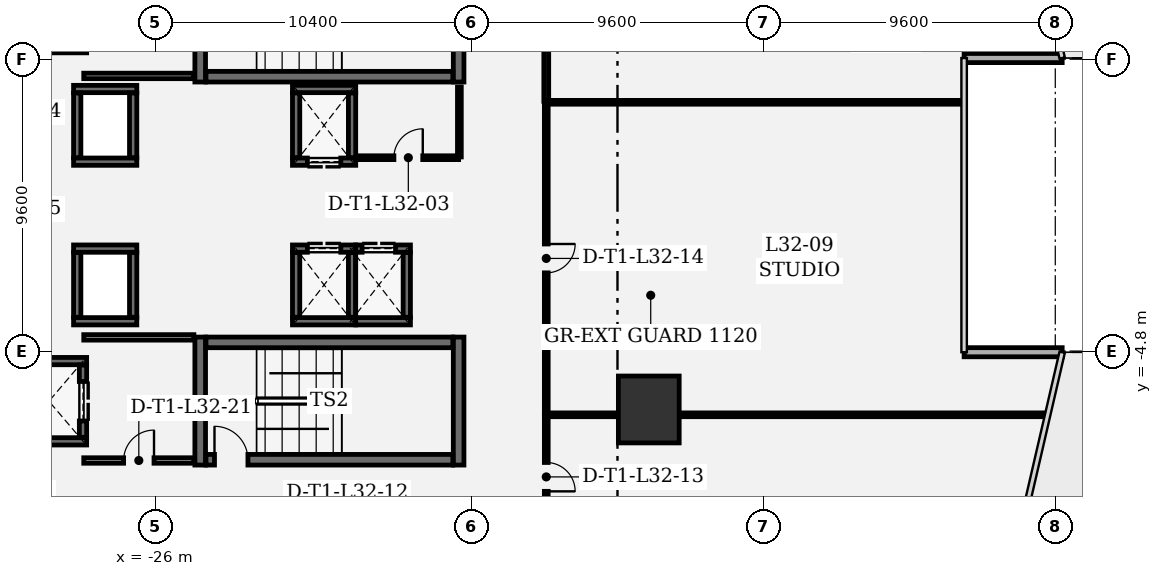
"""IFC4 building model, lengths in metres.
Left out: names, types, materials, properties, quantities, classifications, styles, units other than length and angle.
Written with IfcOpenShell. Run it as: python <this file> out.ifc"""

import sys

from ifc_helpers import new_model, si_unit, direction, frame, frame_2d, origin, origin_2d, place, context, subcontext, project, spatial, rectangle, extrude, element, fill, save


model = new_model("IFC4")
c1 = context("Model", 3, precision=1e-05, world=origin(), true_north=direction((0.0, 1.0)))
c2 = subcontext(c1, "Body", "Model", "MODEL_VIEW")
j1 = project(units=[si_unit("LENGTHUNIT", "METRE"), si_unit("PLANEANGLEUNIT", "RADIAN")], contexts=[c1])
p1 = place(None, origin())
s1 = spatial("IfcSite", under=j1, at=p1, CompositionType="ELEMENT")
p2 = place(p1, origin())
s2 = spatial("IfcBuilding", under=s1, at=p2, CompositionType="ELEMENT")
p3 = place(p2, frame((0.0, 0.0, 142.2)))
s3 = spatial("IfcBuildingStorey", under=s2, at=p3, CompositionType="ELEMENT", Elevation=142.2)
p4 = place(p3, frame((-9.77, -6.721, 0.0), z_axis=(0.0, 0.0, 1.0), x_axis=(1.0, 0.0, 0.0)))
e1 = element("IfcColumn", 1, at=p4, inside=s3, PredefinedType="COLUMN", context=c2, shape_type="SweptSolid", body=[
    extrude(rectangle(XDim=2.0, YDim=2.2, at=origin_2d()), origin(), (0.0, 0.0, 1.0), 4.05),
])
for number, where, z_axis, x_axis in (
    (2, (3.827, -4.838, 0.0), (0.0, 0.0, 1.0), (-1.0, 0.0, 0.0)),
    (3, (0.602, 4.838, 0.0), (0.0, 0.0, 1.0), (1.0, 0.0, 0.0)),
):
    element("IfcWall", number, at=place(p3, frame(where, z_axis=z_axis, x_axis=x_axis)), inside=s3, PredefinedType="SOLIDWALL", context=c2, shape_type="SweptSolid", body=[
        extrude(rectangle(XDim=3.226, YDim=0.3, at=frame_2d((1.613, 0.0))), origin(), (0.0, 0.0, 1.0), 3.78),
    ])
for number, where, z_axis, x_axis in (
    (4, (-24.525, 8.26, 0.0), (0.0, 0.0, 1.0), (0.0, -1.0, 0.0)),
    (5, (-16.025, 4.05, 0.0), (0.0, 0.0, 1.0), (0.0, 1.0, 0.0)),
):
    element("IfcWall", number, at=place(p3, frame(where, z_axis=z_axis, x_axis=x_axis)), inside=s3, PredefinedType="SHEAR", context=c2, shape_type="SweptSolid", body=[
        extrude(rectangle(XDim=4.21, YDim=0.35, at=frame_2d((2.105, 0.0))), origin(), (0.0, 0.0, 1.0), 3.78),
    ])
p5 = place(p3, frame((-24.335, 4.225, 0.0), z_axis=(0.0, 0.0, 1.0), x_axis=(1.0, 0.0, 0.0)))
e6 = element("IfcWall", 6, at=p5, inside=s3, PredefinedType="SHEAR", context=c2, shape_type="SweptSolid", body=[
    extrude(rectangle(XDim=8.12, YDim=0.35, at=frame_2d((4.06, 0.0))), origin(), (0.0, 0.0, 1.0), 3.78),
])
for number, where, z_axis, x_axis in (
    (7, (-24.525, -4.34, 0.0), (0.0, 0.0, 1.0), (0.0, -1.0, 0.0)),
    (8, (-16.025, -8.55, 0.0), (0.0, 0.0, 1.0), (0.0, 1.0, 0.0)),
):
    element("IfcWall", number, at=place(p3, frame(where, z_axis=z_axis, x_axis=x_axis)), inside=s3, PredefinedType="SHEAR", context=c2, shape_type="SweptSolid", body=[
        extrude(rectangle(XDim=4.21, YDim=0.35, at=frame_2d((2.105, 0.0))), origin(), (0.0, 0.0, 1.0), 3.78),
    ])
p6 = place(p3, frame((-24.335, -8.375, 0.0), z_axis=(0.0, 0.0, 1.0), x_axis=(1.0, 0.0, 0.0)))
e9 = element("IfcWall", 9, at=p6, inside=s3, PredefinedType="SHEAR", context=c2, shape_type="SweptSolid", body=[
    extrude(rectangle(XDim=8.12, YDim=0.35, at=frame_2d((4.06, 0.0))), origin(), (0.0, 0.0, 1.0), 3.78),
])
p7 = place(p6, frame((0.28, 0.0, 0.0)))
e10 = element("IfcOpeningElement", 10, at=p7, cuts=e9, PredefinedType="OPENING", context=c2, shape_type="SweptSolid", body=[
    extrude(rectangle(XDim=1.1, YDim=2.2, at=frame_2d((0.55, 1.1))), frame((0.0, 0.185, 0.0), z_axis=(0.0, -1.0, 0.0), x_axis=(1.0, 0.0, 0.0)), (0.0, 0.0, 1.0), 0.37),
])
p8 = place(p3, frame((-16.215, -4.515, 0.0), z_axis=(0.0, 0.0, 1.0), x_axis=(-1.0, 0.0, 0.0)))
e11 = element("IfcWall", 11, at=p8, inside=s3, PredefinedType="SHEAR", context=c2, shape_type="SweptSolid", body=[
    extrude(rectangle(XDim=8.12, YDim=0.35, at=frame_2d((4.06, 0.0))), origin(), (0.0, 0.0, 1.0), 3.78),
])
for number, where, z_axis, x_axis in (
    (12, (-28.26, 5.13, 0.0), (0.0, 0.0, 1.0), (-1.0, 0.0, 0.0)),
    (13, (-28.26, -7.77, 0.0), (0.0, 0.0, 1.0), (-1.0, 0.0, 0.0)),
    (14, (-30.74, -5.13, 0.0), (0.0, 0.0, 1.0), (1.0, 0.0, 0.0)),
):
    element("IfcWall", number, at=place(p3, frame(where, z_axis=z_axis, x_axis=x_axis)), inside=s3, PredefinedType="SHEAR", context=c2, shape_type="SweptSolid", body=[
        extrude(rectangle(XDim=2.48, YDim=0.24, at=frame_2d((1.24, 0.0))), origin(), (0.0, 0.0, 1.0), 3.78),
    ])
p9 = place(p3, frame((-28.38, -5.262, 0.0), z_axis=(0.0, 0.0, 1.0), x_axis=(0.0, -1.0, 0.0)))
e15 = element("IfcWall", 15, at=p9, inside=s3, PredefinedType="SHEAR", context=c2, shape_type="SweptSolid", body=[
    extrude(rectangle(XDim=2.376, YDim=0.24, at=frame_2d((1.188, 0.0))), origin(), (0.0, 0.0, 1.0), 3.78),
])
p10 = place(p9, frame((0.538, 0.0, 0.0)))
e16 = element("IfcOpeningElement", 16, at=p10, cuts=e15, PredefinedType="OPENING", context=c2, shape_type="SweptSolid", body=[
    extrude(rectangle(XDim=1.3, YDim=2.3, at=frame_2d((0.65, 1.15))), frame((0.0, 0.13, 0.0), z_axis=(0.0, -1.0, 0.0), x_axis=(1.0, 0.0, 0.0)), (0.0, 0.0, 1.0), 0.26),
])
for number, where, z_axis, x_axis in (
    (17, (-26.61, 1.43, 0.0), (0.0, 0.0, 1.0), (-1.0, 0.0, 0.0)),
    (18, (-28.69, 3.82, 0.0), (0.0, 0.0, 1.0), (1.0, 0.0, 0.0)),
):
    element("IfcWall", number, at=place(p3, frame(where, z_axis=z_axis, x_axis=x_axis)), inside=s3, PredefinedType="SHEAR", context=c2, shape_type="SweptSolid", body=[
        extrude(rectangle(XDim=2.08, YDim=0.24, at=frame_2d((1.04, 0.0))), origin(), (0.0, 0.0, 1.0), 3.78),
    ])
for number, where, z_axis, x_axis in (
    (19, (-28.57, 1.562, 0.0), (0.0, 0.0, 1.0), (0.0, 1.0, 0.0)),
    (20, (-26.73, 3.688, 0.0), (0.0, 0.0, 1.0), (0.0, -1.0, 0.0)),
):
    element("IfcWall", number, at=place(p3, frame(where, z_axis=z_axis, x_axis=x_axis)), inside=s3, PredefinedType="SHEAR", context=c2, shape_type="SweptSolid", body=[
        extrude(rectangle(XDim=2.126, YDim=0.24, at=frame_2d((1.063, 0.0))), origin(), (0.0, 0.0, 1.0), 3.78),
    ])
p11 = place(p3, frame((-19.41, 1.43, 0.0), z_axis=(0.0, 0.0, 1.0), x_axis=(-1.0, 0.0, 0.0)))
e21 = element("IfcWall", 21, at=p11, inside=s3, PredefinedType="SHEAR", context=c2, shape_type="SweptSolid", body=[
    extrude(rectangle(XDim=2.08, YDim=0.24, at=frame_2d((1.04, 0.0))), origin(), (0.0, 0.0, 1.0), 3.78),
])
p12 = place(p11, frame((0.49, 0.0, 0.0)))
e22 = element("IfcOpeningElement", 22, at=p12, cuts=e21, PredefinedType="OPENING", context=c2, shape_type="SweptSolid", body=[
    extrude(rectangle(XDim=1.1, YDim=2.2, at=frame_2d((0.55, 1.1))), frame((0.0, 0.13, 0.0), z_axis=(0.0, -1.0, 0.0), x_axis=(1.0, 0.0, 0.0)), (0.0, 0.0, 1.0), 0.26),
])
p13 = place(p3, frame((-21.49, 3.82, 0.0), z_axis=(0.0, 0.0, 1.0), x_axis=(1.0, 0.0, 0.0)))
e23 = element("IfcWall", 23, at=p13, inside=s3, PredefinedType="SHEAR", context=c2, shape_type="SweptSolid", body=[
    extrude(rectangle(XDim=2.08, YDim=0.24, at=frame_2d((1.04, 0.0))), origin(), (0.0, 0.0, 1.0), 3.78),
])
for number, where, z_axis, x_axis in (
    (24, (-21.37, 1.562, 0.0), (0.0, 0.0, 1.0), (0.0, 1.0, 0.0)),
    (25, (-19.53, 3.688, 0.0), (0.0, 0.0, 1.0), (0.0, -1.0, 0.0)),
):
    element("IfcWall", number, at=place(p3, frame(where, z_axis=z_axis, x_axis=x_axis)), inside=s3, PredefinedType="SHEAR", context=c2, shape_type="SweptSolid", body=[
        extrude(rectangle(XDim=2.126, YDim=0.24, at=frame_2d((1.063, 0.0))), origin(), (0.0, 0.0, 1.0), 3.78),
    ])
for number, where, z_axis, x_axis in (
    (26, (-26.61, -3.82, 0.0), (0.0, 0.0, 1.0), (-1.0, 0.0, 0.0)),
    (27, (-28.69, -1.43, 0.0), (0.0, 0.0, 1.0), (1.0, 0.0, 0.0)),
):
    element("IfcWall", number, at=place(p3, frame(where, z_axis=z_axis, x_axis=x_axis)), inside=s3, PredefinedType="SHEAR", context=c2, shape_type="SweptSolid", body=[
        extrude(rectangle(XDim=2.08, YDim=0.24, at=frame_2d((1.04, 0.0))), origin(), (0.0, 0.0, 1.0), 3.78),
    ])
for number, where, z_axis, x_axis in (
    (28, (-28.57, -3.688, 0.0), (0.0, 0.0, 1.0), (0.0, 1.0, 0.0)),
    (29, (-26.73, -1.562, 0.0), (0.0, 0.0, 1.0), (0.0, -1.0, 0.0)),
):
    element("IfcWall", number, at=place(p3, frame(where, z_axis=z_axis, x_axis=x_axis)), inside=s3, PredefinedType="SHEAR", context=c2, shape_type="SweptSolid", body=[
        extrude(rectangle(XDim=2.126, YDim=0.24, at=frame_2d((1.063, 0.0))), origin(), (0.0, 0.0, 1.0), 3.78),
    ])
p14 = place(p3, frame((-19.41, -3.82, 0.0), z_axis=(0.0, 0.0, 1.0), x_axis=(-1.0, 0.0, 0.0)))
e30 = element("IfcWall", 30, at=p14, inside=s3, PredefinedType="SHEAR", context=c2, shape_type="SweptSolid", body=[
    extrude(rectangle(XDim=2.08, YDim=0.24, at=frame_2d((1.04, 0.0))), origin(), (0.0, 0.0, 1.0), 3.78),
])
p15 = place(p3, frame((-21.49, -1.43, 0.0), z_axis=(0.0, 0.0, 1.0), x_axis=(1.0, 0.0, 0.0)))
e31 = element("IfcWall", 31, at=p15, inside=s3, PredefinedType="SHEAR", context=c2, shape_type="SweptSolid", body=[
    extrude(rectangle(XDim=2.08, YDim=0.24, at=frame_2d((1.04, 0.0))), origin(), (0.0, 0.0, 1.0), 3.78),
])
p16 = place(p15, frame((0.49, 0.0, 0.0)))
e32 = element("IfcOpeningElement", 32, at=p16, cuts=e31, PredefinedType="OPENING", context=c2, shape_type="SweptSolid", body=[
    extrude(rectangle(XDim=1.1, YDim=2.2, at=frame_2d((0.55, 1.1))), frame((0.0, 0.13, 0.0), z_axis=(0.0, -1.0, 0.0), x_axis=(1.0, 0.0, 0.0)), (0.0, 0.0, 1.0), 0.26),
])
for number, where, z_axis, x_axis in (
    (33, (-21.37, -3.688, 0.0), (0.0, 0.0, 1.0), (0.0, 1.0, 0.0)),
    (34, (-19.53, -1.562, 0.0), (0.0, 0.0, 1.0), (0.0, -1.0, 0.0)),
):
    element("IfcWall", number, at=place(p3, frame(where, z_axis=z_axis, x_axis=x_axis)), inside=s3, PredefinedType="SHEAR", context=c2, shape_type="SweptSolid", body=[
        extrude(rectangle(XDim=2.126, YDim=0.24, at=frame_2d((1.063, 0.0))), origin(), (0.0, 0.0, 1.0), 3.78),
    ])
p17 = place(p3, frame((-17.61, -3.82, 0.0), z_axis=(0.0, 0.0, 1.0), x_axis=(-1.0, 0.0, 0.0)))
e35 = element("IfcWall", 35, at=p17, inside=s3, PredefinedType="SHEAR", context=c2, shape_type="SweptSolid", body=[
    extrude(rectangle(XDim=1.8, YDim=0.24, at=frame_2d((0.9, 0.0))), origin(), (0.0, 0.0, 1.0), 3.78),
])
p18 = place(p3, frame((-19.41, -1.43, 0.0), z_axis=(0.0, 0.0, 1.0), x_axis=(1.0, 0.0, 0.0)))
e36 = element("IfcWall", 36, at=p18, inside=s3, PredefinedType="SHEAR", context=c2, shape_type="SweptSolid", body=[
    extrude(rectangle(XDim=1.8, YDim=0.24, at=frame_2d((0.9, 0.0))), origin(), (0.0, 0.0, 1.0), 3.78),
])
p19 = place(p18, frame((0.21, 0.0, 0.0)))
e37 = element("IfcOpeningElement", 37, at=p19, cuts=e36, PredefinedType="OPENING", context=c2, shape_type="SweptSolid", body=[
    extrude(rectangle(XDim=1.1, YDim=2.2, at=frame_2d((0.55, 1.1))), frame((0.0, 0.13, 0.0), z_axis=(0.0, -1.0, 0.0), x_axis=(1.0, 0.0, 0.0)), (0.0, 0.0, 1.0), 0.26),
])
p20 = place(p3, frame((-17.73, -1.562, 0.0), z_axis=(0.0, 0.0, 1.0), x_axis=(0.0, -1.0, 0.0)))
e38 = element("IfcWall", 38, at=p20, inside=s3, PredefinedType="SHEAR", context=c2, shape_type="SweptSolid", body=[
    extrude(rectangle(XDim=2.126, YDim=0.24, at=frame_2d((1.063, 0.0))), origin(), (0.0, 0.0, 1.0), 3.78),
])
p21 = place(p3, frame((-28.355, 4.25, 0.0), z_axis=(0.0, 0.0, 1.0), x_axis=(1.0, 0.0, 0.0)))
e39 = element("IfcWall", 39, at=p21, inside=s3, PredefinedType="PARTITIONING", context=c2, shape_type="SweptSolid", body=[
    extrude(rectangle(XDim=3.622, YDim=0.18, at=frame_2d((1.811, 0.0))), origin(), (0.0, 0.0, 1.0), 3.78),
])
p22 = place(p3, frame((-28.355, -8.4, 0.0), z_axis=(0.0, 0.0, 1.0), x_axis=(1.0, 0.0, 0.0)))
e40 = element("IfcWall", 40, at=p22, inside=s3, PredefinedType="PARTITIONING", context=c2, shape_type="SweptSolid", body=[
    extrude(rectangle(XDim=3.622, YDim=0.18, at=frame_2d((1.811, 0.0))), origin(), (0.0, 0.0, 1.0), 3.78),
])
p23 = place(p22, frame((1.311, 0.0, 0.0)))
e41 = element("IfcOpeningElement", 41, at=p23, cuts=e40, PredefinedType="OPENING", context=c2, shape_type="SweptSolid", body=[
    extrude(rectangle(XDim=1.0, YDim=2.15, at=frame_2d((0.5, 1.075))), frame((0.0, 0.1, 0.0), z_axis=(0.0, -1.0, 0.0), x_axis=(1.0, 0.0, 0.0)), (0.0, 0.0, 1.0), 0.2),
])
p24 = place(p3, frame((-24.733, -4.35, 0.0), z_axis=(0.0, 0.0, 1.0), x_axis=(-1.0, 0.0, 0.0)))
e42 = element("IfcWall", 42, at=p24, inside=s3, PredefinedType="PARTITIONING", context=c2, shape_type="SweptSolid", body=[
    extrude(rectangle(XDim=3.622, YDim=0.18, at=frame_2d((1.811, 0.0))), origin(), (0.0, 0.0, 1.0), 3.78),
])
p25 = place(p3, frame((-19.334, 1.56, 0.0), z_axis=(0.0, 0.0, 1.0), x_axis=(1.0, 0.0, 0.0)))
e43 = element("IfcWall", 43, at=p25, inside=s3, PredefinedType="PARTITIONING", context=c2, shape_type="SweptSolid", body=[
    extrude(rectangle(XDim=3.309, YDim=0.125, at=frame_2d((1.654, 0.0))), origin(), (0.0, 0.0, 1.0), 3.78),
])
p26 = place(p25, frame((1.179, 0.0, 0.0)))
e44 = element("IfcOpeningElement", 44, at=p26, cuts=e43, PredefinedType="OPENING", context=c2, shape_type="SweptSolid", body=[
    extrude(rectangle(XDim=0.95, YDim=2.15, at=frame_2d((0.475, 1.075))), frame((0.0, 0.073, 0.0), z_axis=(0.0, -1.0, 0.0), x_axis=(1.0, 0.0, 0.0)), (0.0, 0.0, 1.0), 0.145),
])
p27 = place(p3, frame((-16.0, 1.585, 0.0), z_axis=(0.0, 0.0, 1.0), x_axis=(0.0, 1.0, 0.0)))
e45 = element("IfcWall", 45, at=p27, inside=s3, PredefinedType="PARTITIONING", context=c2, shape_type="SweptSolid", body=[
    extrude(rectangle(XDim=2.302, YDim=0.125, at=frame_2d((1.151, 0.0))), origin(), (0.0, 0.0, 1.0), 3.78),
])
p28 = place(p3, frame((3.271, -6.897, 0.0), z_axis=(0.0, 0.0, 1.0), x_axis=(-1.0, 0.0, 0.0)))
e46 = element("IfcWall", 46, at=p28, inside=s3, PredefinedType="PARTITIONING", context=c2, shape_type="SweptSolid", body=[
    extrude(rectangle(XDim=11.976, YDim=0.125, at=frame_2d((5.988, 0.0))), origin(), (0.0, 0.0, 1.0), 3.78),
])
p29 = place(p3, frame((-10.835, -6.897, 0.0), z_axis=(0.0, 0.0, 1.0), x_axis=(-1.0, 0.0, 0.0)))
e47 = element("IfcWall", 47, at=p29, inside=s3, PredefinedType="PARTITIONING", context=c2, shape_type="SweptSolid", body=[
    extrude(rectangle(XDim=2.282, YDim=0.125, at=frame_2d((1.141, 0.0))), origin(), (0.0, 0.0, 1.0), 3.78),
])
p30 = place(p3, frame((-13.142, -6.922, 0.0), z_axis=(0.0, 0.0, 1.0), x_axis=(0.0, -1.0, 0.0)))
e48 = element("IfcWall", 48, at=p30, inside=s3, PredefinedType="PARTITIONING", context=c2, shape_type="SweptSolid", body=[
    extrude(rectangle(XDim=4.036, YDim=0.125, at=frame_2d((2.018, 0.0))), origin(), (0.0, 0.0, 1.0), 3.78),
])
p31 = place(p30, frame((1.543, 0.0, 0.0)))
e49 = element("IfcOpeningElement", 49, at=p31, cuts=e48, PredefinedType="OPENING", context=c2, shape_type="SweptSolid", body=[
    extrude(rectangle(XDim=0.95, YDim=2.15, at=frame_2d((0.475, 1.075))), frame((0.0, 0.073, 0.0), z_axis=(0.0, -1.0, 0.0), x_axis=(1.0, 0.0, 0.0)), (0.0, 0.0, 1.0), 0.145),
])
p32 = place(p3, frame((0.521, 3.383, 0.0), z_axis=(0.0, 0.0, 1.0), x_axis=(-1.0, 0.0, 0.0)))
e50 = element("IfcWall", 50, at=p32, inside=s3, PredefinedType="PARTITIONING", context=c2, shape_type="SweptSolid", body=[
    extrude(rectangle(XDim=13.639, YDim=0.125, at=frame_2d((6.819, 0.0))), origin(), (0.0, 0.0, 1.0), 3.78),
])
p33 = place(p3, frame((-13.142, 3.358, 0.0), z_axis=(0.0, 0.0, 1.0), x_axis=(0.0, -1.0, 0.0)))
e51 = element("IfcWall", 51, at=p33, inside=s3, PredefinedType="PARTITIONING", context=c2, shape_type="SweptSolid", body=[
    extrude(rectangle(XDim=10.222, YDim=0.125, at=frame_2d((5.111, 0.0))), origin(), (0.0, 0.0, 1.0), 3.78),
])
p34 = place(p33, frame((4.636, 0.0, 0.0)))
e52 = element("IfcOpeningElement", 52, at=p34, cuts=e51, PredefinedType="OPENING", context=c2, shape_type="SweptSolid", body=[
    extrude(rectangle(XDim=0.95, YDim=2.15, at=frame_2d((0.475, 1.075))), frame((0.0, 0.073, 0.0), z_axis=(0.0, -1.0, 0.0), x_axis=(1.0, 0.0, 0.0)), (0.0, 0.0, 1.0), 0.145),
])
p35 = place(p3, frame((-13.142, 8.287, 0.0), z_axis=(0.0, 0.0, 1.0), x_axis=(0.0, -1.0, 0.0)))
e53 = element("IfcWall", 53, at=p35, inside=s3, PredefinedType="PARTITIONING", context=c2, shape_type="SweptSolid", body=[
    extrude(rectangle(XDim=4.871, YDim=0.16, at=frame_2d((2.436, 0.0))), origin(), (0.0, 0.0, 1.0), 3.78),
])
p36 = place(p7, origin())
e54 = element("IfcDoor", 54, at=p36, inside=s3, OperationType="SINGLE_SWING_LEFT", PredefinedType="DOOR", context=c2, shape_type="SweptSolid", body=[
    extrude(rectangle(XDim=1.1, YDim=2.2, at=frame_2d((0.55, 1.1))), frame((0.0, 0.025, 0.0), z_axis=(0.0, -1.0, 0.0), x_axis=(1.0, 0.0, 0.0)), (0.0, 0.0, 1.0), 0.05),
])
fill(e10, e54)
p37 = place(p10, origin())
e55 = element("IfcDoor", 55, at=p37, inside=s3, OperationType="DOUBLE_DOOR_SLIDING", PredefinedType="DOOR", context=c2, shape_type="SweptSolid", body=[
    extrude(rectangle(XDim=1.3, YDim=2.3, at=frame_2d((0.65, 1.15))), frame((0.0, 0.025, 0.0), z_axis=(0.0, -1.0, 0.0), x_axis=(1.0, 0.0, 0.0)), (0.0, 0.0, 1.0), 0.05),
])
fill(e16, e55)
p38 = place(p12, origin())
e56 = element("IfcDoor", 56, at=p38, inside=s3, OperationType="DOUBLE_DOOR_SLIDING", PredefinedType="DOOR", context=c2, shape_type="SweptSolid", body=[
    extrude(rectangle(XDim=1.1, YDim=2.2, at=frame_2d((0.55, 1.1))), frame((0.0, 0.025, 0.0), z_axis=(0.0, -1.0, 0.0), x_axis=(1.0, 0.0, 0.0)), (0.0, 0.0, 1.0), 0.05),
])
fill(e22, e56)
p39 = place(p16, origin())
e57 = element("IfcDoor", 57, at=p39, inside=s3, OperationType="DOUBLE_DOOR_SLIDING", PredefinedType="DOOR", context=c2, shape_type="SweptSolid", body=[
    extrude(rectangle(XDim=1.1, YDim=2.2, at=frame_2d((0.55, 1.1))), frame((0.0, 0.025, 0.0), z_axis=(0.0, -1.0, 0.0), x_axis=(1.0, 0.0, 0.0)), (0.0, 0.0, 1.0), 0.05),
])
fill(e32, e57)
p40 = place(p19, origin())
e58 = element("IfcDoor", 58, at=p40, inside=s3, OperationType="DOUBLE_DOOR_SLIDING", PredefinedType="DOOR", context=c2, shape_type="SweptSolid", body=[
    extrude(rectangle(XDim=1.1, YDim=2.2, at=frame_2d((0.55, 1.1))), frame((0.0, 0.025, 0.0), z_axis=(0.0, -1.0, 0.0), x_axis=(1.0, 0.0, 0.0)), (0.0, 0.0, 1.0), 0.05),
])
fill(e37, e58)
p41 = place(p26, origin())
e59 = element("IfcDoor", 59, at=p41, inside=s3, OperationType="SINGLE_SWING_RIGHT", PredefinedType="DOOR", context=c2, shape_type="SweptSolid", body=[
    extrude(rectangle(XDim=0.95, YDim=2.15, at=frame_2d((0.475, 1.075))), frame((0.0, 0.025, 0.0), z_axis=(0.0, -1.0, 0.0), x_axis=(1.0, 0.0, 0.0)), (0.0, 0.0, 1.0), 0.05),
])
fill(e44, e59)
p42 = place(p31, origin())
e60 = element("IfcDoor", 60, at=p42, inside=s3, OperationType="SINGLE_SWING_RIGHT", PredefinedType="DOOR", context=c2, shape_type="SweptSolid", body=[
    extrude(rectangle(XDim=0.95, YDim=2.15, at=frame_2d((0.475, 1.075))), frame((0.0, 0.025, 0.0), z_axis=(0.0, -1.0, 0.0), x_axis=(1.0, 0.0, 0.0)), (0.0, 0.0, 1.0), 0.05),
])
fill(e49, e60)
p43 = place(p34, origin())
e61 = element("IfcDoor", 61, at=p43, inside=s3, OperationType="SINGLE_SWING_LEFT", PredefinedType="DOOR", context=c2, shape_type="SweptSolid", body=[
    extrude(rectangle(XDim=0.95, YDim=2.15, at=frame_2d((0.475, 1.075))), frame((0.0, 0.025, 0.0), z_axis=(0.0, -1.0, 0.0), x_axis=(1.0, 0.0, 0.0)), (0.0, 0.0, 1.0), 0.05),
])
fill(e52, e61)
p44 = place(p23, origin())
e62 = element("IfcDoor", 62, at=p44, inside=s3, OperationType="SINGLE_SWING_RIGHT", PredefinedType="DOOR", context=c2, shape_type="SweptSolid", body=[
    extrude(rectangle(XDim=1.0, YDim=2.15, at=frame_2d((0.5, 1.075))), frame((0.0, 0.025, 0.0), z_axis=(0.0, -1.0, 0.0), x_axis=(1.0, 0.0, 0.0)), (0.0, 0.0, 1.0), 0.05),
])
fill(e41, e62)
save(model, sys.argv[1])
